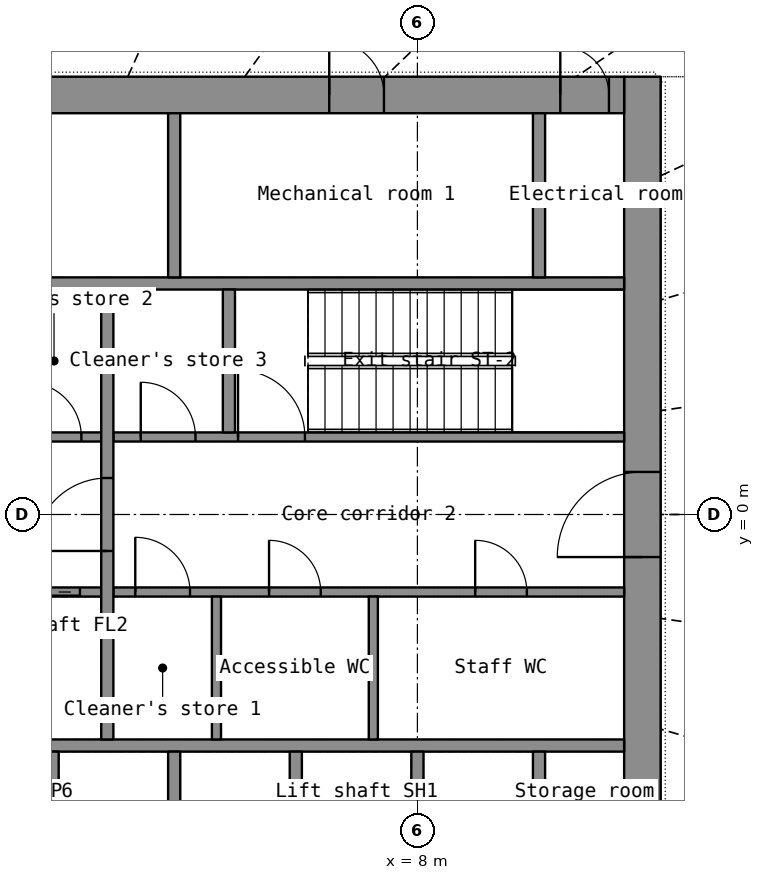
"""IFC4 building model, lengths in metres.
Left out: names, types, materials, properties, quantities, classifications, styles, units other than length and angle.
Written with IfcOpenShell. Run it as: python <this file> out.ifc"""

import sys

from ifc_helpers import new_model, si_unit, direction, frame, frame_2d, origin, place, context, subcontext, project, spatial, rectangle, extrude, element, fill, save


model = new_model("IFC4")
c1 = context("Model", 3, precision=1e-05, world=origin(), true_north=direction((0.0, 1.0)))
c2 = subcontext(c1, "Body", "Model", "MODEL_VIEW")
j1 = project(units=[si_unit("LENGTHUNIT", "METRE"), si_unit("PLANEANGLEUNIT", "RADIAN")], contexts=[c1])
p1 = place(None, origin())
s1 = spatial("IfcSite", under=j1, at=p1, CompositionType="ELEMENT")
p2 = place(p1, origin())
s2 = spatial("IfcBuilding", under=s1, at=p2, CompositionType="ELEMENT")
p3 = place(p2, frame((0.0, 0.0, 20.0)))
s3 = spatial("IfcBuildingStorey", under=s2, at=p3, CompositionType="ELEMENT", Elevation=20.0)
p4 = place(p3, frame((11.7, -7.2, 0.0), z_axis=(0.0, 0.0, 1.0), x_axis=(0.0, 1.0, 0.0)))
e1 = element("IfcWall", 1, at=p4, inside=s3, PredefinedType="SHEAR", context=c2, shape_type="SweptSolid", body=[
    extrude(rectangle(XDim=14.4, YDim=0.6, at=frame_2d((7.2, 0.0))), origin(), (0.0, 0.0, 1.0), 4.1),
])
p5 = place(p4, frame((6.5, 0.0, 0.0)))
e2 = element("IfcOpeningElement", 2, at=p5, cuts=e1, PredefinedType="OPENING", context=c2, shape_type="SweptSolid", body=[
    extrude(rectangle(XDim=1.4, YDim=2.2, at=frame_2d((0.7, 1.1))), frame((0.0, 0.31, 0.0), z_axis=(0.0, -1.0, 0.0), x_axis=(1.0, 0.0, 0.0)), (0.0, 0.0, 1.0), 0.62),
])
p6 = place(p3, frame((-11.4, 6.9, 0.0), z_axis=(0.0, 0.0, 1.0), x_axis=(1.0, 0.0, 0.0)))
e3 = element("IfcWall", 3, at=p6, inside=s3, PredefinedType="SHEAR", context=c2, shape_type="SweptSolid", body=[
    extrude(rectangle(XDim=22.8, YDim=0.6, at=frame_2d((11.4, 0.0))), origin(), (0.0, 0.0, 1.0), 4.1),
])
p7 = place(p6, frame((1.85, 0.0, 0.0)))
e4 = element("IfcOpeningElement", 4, at=p7, cuts=e3, PredefinedType="OPENING", context=c2, shape_type="SweptSolid", body=[
    extrude(rectangle(XDim=1.1, YDim=2.2, at=frame_2d((0.55, 1.1))), frame((0.0, 0.31, 0.0), z_axis=(0.0, -1.0, 0.0), x_axis=(1.0, 0.0, 0.0)), (0.0, 0.0, 1.0), 0.62),
])
p8 = place(p6, frame((9.95, 0.0, 0.0)))
e5 = element("IfcOpeningElement", 5, at=p8, cuts=e3, PredefinedType="OPENING", context=c2, shape_type="SweptSolid", body=[
    extrude(rectangle(XDim=0.9, YDim=2.1, at=frame_2d((0.45, 1.05))), frame((0.0, 0.31, 0.0), z_axis=(0.0, -1.0, 0.0), x_axis=(1.0, 0.0, 0.0)), (0.0, 0.0, 1.0), 0.62),
])
p9 = place(p6, frame((17.95, 0.0, 0.0)))
e6 = element("IfcOpeningElement", 6, at=p9, cuts=e3, PredefinedType="OPENING", context=c2, shape_type="SweptSolid", body=[
    extrude(rectangle(XDim=0.9, YDim=2.1, at=frame_2d((0.45, 1.05))), frame((0.0, 0.31, 0.0), z_axis=(0.0, -1.0, 0.0), x_axis=(1.0, 0.0, 0.0)), (0.0, 0.0, 1.0), 0.62),
])
p10 = place(p6, frame((0.25, 0.0, 0.0)))
e7 = element("IfcOpeningElement", 7, at=p10, cuts=e3, PredefinedType="OPENING", context=c2, shape_type="SweptSolid", body=[
    extrude(rectangle(XDim=0.8, YDim=2.05, at=frame_2d((0.4, 1.025))), frame((0.0, 0.31, 0.0), z_axis=(0.0, -1.0, 0.0), x_axis=(1.0, 0.0, 0.0)), (0.0, 0.0, 1.0), 0.62),
])
p11 = place(p6, frame((21.75, 0.0, 0.0)))
e8 = element("IfcOpeningElement", 8, at=p11, cuts=e3, PredefinedType="OPENING", context=c2, shape_type="SweptSolid", body=[
    extrude(rectangle(XDim=0.8, YDim=2.05, at=frame_2d((0.4, 1.025))), frame((0.0, 0.31, 0.0), z_axis=(0.0, -1.0, 0.0), x_axis=(1.0, 0.0, 0.0)), (0.0, 0.0, 1.0), 0.62),
])
for number, where, z_axis, x_axis in (
    (9, (-11.4, -3.8, 0.0), (0.0, 0.0, 1.0), (1.0, 0.0, 0.0)),
    (10, (-11.4, 3.8, 0.0), (0.0, 0.0, 1.0), (1.0, 0.0, 0.0)),
):
    element("IfcWall", number, at=place(p3, frame(where, z_axis=z_axis, x_axis=x_axis)), inside=s3, PredefinedType="SHEAR", context=c2, shape_type="SweptSolid", body=[
        extrude(rectangle(XDim=22.8, YDim=0.2, at=frame_2d((11.4, 0.0))), origin(), (0.0, 0.0, 1.0), 4.1),
    ])
for number, where, z_axis, x_axis in (
    (11, (2.0, -6.6, 0.0), (0.0, 0.0, 1.0), (0.0, 1.0, 0.0)),
    (12, (4.0, -6.6, 0.0), (0.0, 0.0, 1.0), (0.0, 1.0, 0.0)),
    (13, (6.0, -6.6, 0.0), (0.0, 0.0, 1.0), (0.0, 1.0, 0.0)),
    (14, (8.0, -6.6, 0.0), (0.0, 0.0, 1.0), (0.0, 1.0, 0.0)),
    (15, (10.0, -6.6, 0.0), (0.0, 0.0, 1.0), (0.0, 1.0, 0.0)),
    (16, (10.0, 3.9, 0.0), (0.0, 0.0, 1.0), (0.0, 1.0, 0.0)),
):
    element("IfcWall", number, at=place(p3, frame(where, z_axis=z_axis, x_axis=x_axis)), inside=s3, PredefinedType="SHEAR", context=c2, shape_type="SweptSolid", body=[
        extrude(rectangle(XDim=2.7, YDim=0.2, at=frame_2d((1.35, 0.0))), origin(), (0.0, 0.0, 1.0), 4.1),
    ])
p12 = place(p3, frame((4.0, 3.9, 0.0), z_axis=(0.0, 0.0, 1.0), x_axis=(0.0, 1.0, 0.0)))
e17 = element("IfcWall", 17, at=p12, inside=s3, PredefinedType="PARTITIONING", context=c2, shape_type="SweptSolid", body=[
    extrude(rectangle(XDim=2.7, YDim=0.2, at=frame_2d((1.35, 0.0))), origin(), (0.0, 0.0, 1.0), 4.1),
])
p13 = place(p3, frame((-2.8, -1.275, 0.0), z_axis=(0.0, 0.0, 1.0), x_axis=(1.0, 0.0, 0.0)))
e18 = element("IfcWall", 18, at=p13, inside=s3, PredefinedType="SHEAR", context=c2, shape_type="SweptSolid", body=[
    extrude(rectangle(XDim=5.6, YDim=0.15, at=frame_2d((2.8, 0.0))), origin(), (0.0, 0.0, 1.0), 4.1),
])
p14 = place(p13, frame((4.15, 0.0, 0.0)))
e19 = element("IfcOpeningElement", 19, at=p14, cuts=e18, PredefinedType="OPENING", context=c2, shape_type="SweptSolid", body=[
    extrude(rectangle(XDim=1.1, YDim=2.2, at=frame_2d((0.55, 1.1))), frame((0.0, 0.085, 0.0), z_axis=(0.0, -1.0, 0.0), x_axis=(1.0, 0.0, 0.0)), (0.0, 0.0, 1.0), 0.17),
])
p15 = place(p13, frame((0.326, 0.0, 0.0)))
e20 = element("IfcOpeningElement", 20, at=p15, cuts=e18, PredefinedType="OPENING", context=c2, shape_type="SweptSolid", body=[
    extrude(rectangle(XDim=0.9, YDim=2.1, at=frame_2d((0.45, 1.05))), frame((0.0, 0.085, 0.0), z_axis=(0.0, -1.0, 0.0), x_axis=(1.0, 0.0, 0.0)), (0.0, 0.0, 1.0), 0.17),
])
p16 = place(p13, frame((2.201, 0.0, 0.0)))
e21 = element("IfcOpeningElement", 21, at=p16, cuts=e18, PredefinedType="OPENING", context=c2, shape_type="SweptSolid", body=[
    extrude(rectangle(XDim=0.9, YDim=2.1, at=frame_2d((0.45, 1.05))), frame((0.0, 0.085, 0.0), z_axis=(0.0, -1.0, 0.0), x_axis=(1.0, 0.0, 0.0)), (0.0, 0.0, 1.0), 0.17),
])
p17 = place(p3, frame((3.0, -1.275, 0.0), z_axis=(0.0, 0.0, 1.0), x_axis=(1.0, 0.0, 0.0)))
e22 = element("IfcWall", 22, at=p17, inside=s3, PredefinedType="PARTITIONING", context=c2, shape_type="SweptSolid", body=[
    extrude(rectangle(XDim=8.4, YDim=0.15, at=frame_2d((4.2, 0.0))), origin(), (0.0, 0.0, 1.0), 4.1),
])
p18 = place(p17, frame((0.36, 0.0, 0.0)))
e23 = element("IfcOpeningElement", 23, at=p18, cuts=e22, PredefinedType="OPENING", context=c2, shape_type="SweptSolid", body=[
    extrude(rectangle(XDim=0.9, YDim=2.1, at=frame_2d((0.45, 1.05))), frame((0.0, 0.085, 0.0), z_axis=(0.0, -1.0, 0.0), x_axis=(1.0, 0.0, 0.0)), (0.0, 0.0, 1.0), 0.17),
])
p19 = place(p17, frame((2.56, 0.0, 0.0)))
e24 = element("IfcOpeningElement", 24, at=p19, cuts=e22, PredefinedType="OPENING", context=c2, shape_type="SweptSolid", body=[
    extrude(rectangle(XDim=0.85, YDim=2.1, at=frame_2d((0.425, 1.05))), frame((0.0, 0.085, 0.0), z_axis=(0.0, -1.0, 0.0), x_axis=(1.0, 0.0, 0.0)), (0.0, 0.0, 1.0), 0.17),
])
p20 = place(p17, frame((5.95, 0.0, 0.0)))
e25 = element("IfcOpeningElement", 25, at=p20, cuts=e22, PredefinedType="OPENING", context=c2, shape_type="SweptSolid", body=[
    extrude(rectangle(XDim=0.85, YDim=2.1, at=frame_2d((0.425, 1.05))), frame((0.0, 0.085, 0.0), z_axis=(0.0, -1.0, 0.0), x_axis=(1.0, 0.0, 0.0)), (0.0, 0.0, 1.0), 0.17),
])
p21 = place(p3, frame((-2.8, 1.275, 0.0), z_axis=(0.0, 0.0, 1.0), x_axis=(1.0, 0.0, 0.0)))
e26 = element("IfcWall", 26, at=p21, inside=s3, PredefinedType="SHEAR", context=c2, shape_type="SweptSolid", body=[
    extrude(rectangle(XDim=5.6, YDim=0.15, at=frame_2d((2.8, 0.0))), origin(), (0.0, 0.0, 1.0), 4.1),
])
p22 = place(p21, frame((0.35, 0.0, 0.0)))
e27 = element("IfcOpeningElement", 27, at=p22, cuts=e26, PredefinedType="OPENING", context=c2, shape_type="SweptSolid", body=[
    extrude(rectangle(XDim=1.1, YDim=2.2, at=frame_2d((0.55, 1.1))), frame((0.0, 0.085, 0.0), z_axis=(0.0, -1.0, 0.0), x_axis=(1.0, 0.0, 0.0)), (0.0, 0.0, 1.0), 0.17),
])
p23 = place(p21, frame((2.499, 0.0, 0.0)))
e28 = element("IfcOpeningElement", 28, at=p23, cuts=e26, PredefinedType="OPENING", context=c2, shape_type="SweptSolid", body=[
    extrude(rectangle(XDim=0.9, YDim=2.1, at=frame_2d((0.45, 1.05))), frame((0.0, 0.085, 0.0), z_axis=(0.0, -1.0, 0.0), x_axis=(1.0, 0.0, 0.0)), (0.0, 0.0, 1.0), 0.17),
])
p24 = place(p21, frame((4.374, 0.0, 0.0)))
e29 = element("IfcOpeningElement", 29, at=p24, cuts=e26, PredefinedType="OPENING", context=c2, shape_type="SweptSolid", body=[
    extrude(rectangle(XDim=0.9, YDim=2.1, at=frame_2d((0.45, 1.05))), frame((0.0, 0.085, 0.0), z_axis=(0.0, -1.0, 0.0), x_axis=(1.0, 0.0, 0.0)), (0.0, 0.0, 1.0), 0.17),
])
p25 = place(p3, frame((3.0, 1.275, 0.0), z_axis=(0.0, 0.0, 1.0), x_axis=(1.0, 0.0, 0.0)))
e30 = element("IfcWall", 30, at=p25, inside=s3, PredefinedType="SHEAR", context=c2, shape_type="SweptSolid", body=[
    extrude(rectangle(XDim=8.4, YDim=0.15, at=frame_2d((4.2, 0.0))), origin(), (0.0, 0.0, 1.0), 4.1),
])
p26 = place(p25, frame((2.05, 0.0, 0.0)))
e31 = element("IfcOpeningElement", 31, at=p26, cuts=e30, PredefinedType="OPENING", context=c2, shape_type="SweptSolid", body=[
    extrude(rectangle(XDim=1.1, YDim=2.15, at=frame_2d((0.55, 1.075))), frame((0.0, 0.085, 0.0), z_axis=(0.0, -1.0, 0.0), x_axis=(1.0, 0.0, 0.0)), (0.0, 0.0, 1.0), 0.17),
])
p27 = place(p25, frame((0.45, 0.0, 0.0)))
e32 = element("IfcOpeningElement", 32, at=p27, cuts=e30, PredefinedType="OPENING", context=c2, shape_type="SweptSolid", body=[
    extrude(rectangle(XDim=0.9, YDim=2.1, at=frame_2d((0.45, 1.05))), frame((0.0, 0.085, 0.0), z_axis=(0.0, -1.0, 0.0), x_axis=(1.0, 0.0, 0.0)), (0.0, 0.0, 1.0), 0.17),
])
p28 = place(p3, frame((2.9, -3.7, 0.0), z_axis=(0.0, 0.0, 1.0), x_axis=(0.0, 1.0, 0.0)))
e33 = element("IfcWall", 33, at=p28, inside=s3, PredefinedType="SHEAR", context=c2, shape_type="SweptSolid", body=[
    extrude(rectangle(XDim=7.4, YDim=0.2, at=frame_2d((3.7, 0.0))), origin(), (0.0, 0.0, 1.0), 4.1),
])
p29 = place(p28, frame((3.1, 0.0, 0.0)))
e34 = element("IfcOpeningElement", 34, at=p29, cuts=e33, PredefinedType="OPENING", context=c2, shape_type="SweptSolid", body=[
    extrude(rectangle(XDim=1.2, YDim=2.2, at=frame_2d((0.6, 1.1))), frame((0.0, 0.11, 0.0), z_axis=(0.0, -1.0, 0.0), x_axis=(1.0, 0.0, 0.0)), (0.0, 0.0, 1.0), 0.22),
])
p30 = place(p3, frame((4.9, 1.35, 0.0), z_axis=(0.0, 0.0, 1.0), x_axis=(0.0, 1.0, 0.0)))
e35 = element("IfcWall", 35, at=p30, inside=s3, PredefinedType="SHEAR", context=c2, shape_type="SweptSolid", body=[
    extrude(rectangle(XDim=2.35, YDim=0.2, at=frame_2d((1.175, 0.0))), origin(), (0.0, 0.0, 1.0), 4.1),
])
for number, where, z_axis, x_axis in (
    (36, (4.695, -3.7, 0.0), (0.0, 0.0, 1.0), (0.0, 1.0, 0.0)),
    (37, (7.275, -3.7, 0.0), (0.0, 0.0, 1.0), (0.0, 1.0, 0.0)),
):
    element("IfcWall", number, at=place(p3, frame(where, z_axis=z_axis, x_axis=x_axis)), inside=s3, PredefinedType="PARTITIONING", context=c2, shape_type="SweptSolid", body=[
        extrude(rectangle(XDim=2.35, YDim=0.15, at=frame_2d((1.175, 0.0))), origin(), (0.0, 0.0, 1.0), 4.1),
    ])
p31 = place(p9, origin())
e38 = element("IfcDoor", 38, at=p31, inside=s3, OperationType="SINGLE_SWING_LEFT", PredefinedType="DOOR", context=c2, shape_type="SweptSolid", body=[
    extrude(rectangle(XDim=0.9, YDim=2.1, at=frame_2d((0.45, 1.05))), frame((0.0, 0.025, 0.0), z_axis=(0.0, -1.0, 0.0), x_axis=(1.0, 0.0, 0.0)), (0.0, 0.0, 1.0), 0.05),
])
fill(e6, e38)
p32 = place(p11, origin())
e39 = element("IfcDoor", 39, at=p32, inside=s3, OperationType="SINGLE_SWING_LEFT", PredefinedType="DOOR", context=c2, shape_type="SweptSolid", body=[
    extrude(rectangle(XDim=0.8, YDim=2.05, at=frame_2d((0.4, 1.025))), frame((0.0, 0.025, 0.0), z_axis=(0.0, -1.0, 0.0), x_axis=(1.0, 0.0, 0.0)), (0.0, 0.0, 1.0), 0.05),
])
fill(e8, e39)
p33 = place(p5, origin())
e40 = element("IfcDoor", 40, at=p33, inside=s3, OperationType="DOUBLE_DOOR_SINGLE_SWING", PredefinedType="DOOR", context=c2, shape_type="SweptSolid", body=[
    extrude(rectangle(XDim=1.4, YDim=2.2, at=frame_2d((0.7, 1.1))), frame((0.0, 0.025, 0.0), z_axis=(0.0, -1.0, 0.0), x_axis=(1.0, 0.0, 0.0)), (0.0, 0.0, 1.0), 0.05),
])
fill(e2, e40)
p34 = place(p29, origin())
e41 = element("IfcDoor", 41, at=p34, inside=s3, OperationType="SINGLE_SWING_LEFT", PredefinedType="DOOR", context=c2, shape_type="SweptSolid", body=[
    extrude(rectangle(XDim=1.2, YDim=2.2, at=frame_2d((0.6, 1.1))), frame((0.0, 0.025, 0.0), z_axis=(0.0, -1.0, 0.0), x_axis=(1.0, 0.0, 0.0)), (0.0, 0.0, 1.0), 0.05),
])
fill(e34, e41)
p35 = place(p14, origin())
e42 = element("IfcDoor", 42, at=p35, inside=s3, OperationType="DOUBLE_DOOR_SLIDING", PredefinedType="DOOR", context=c2, shape_type="SweptSolid", body=[
    extrude(rectangle(XDim=1.1, YDim=2.2, at=frame_2d((0.55, 1.1))), frame((0.0, 0.025, 0.0), z_axis=(0.0, -1.0, 0.0), x_axis=(1.0, 0.0, 0.0)), (0.0, 0.0, 1.0), 0.05),
])
fill(e19, e42)
p36 = place(p26, origin())
e43 = element("IfcDoor", 43, at=p36, inside=s3, OperationType="SINGLE_SWING_LEFT", PredefinedType="DOOR", context=c2, shape_type="SweptSolid", body=[
    extrude(rectangle(XDim=1.1, YDim=2.15, at=frame_2d((0.55, 1.075))), frame((0.0, 0.025, 0.0), z_axis=(0.0, -1.0, 0.0), x_axis=(1.0, 0.0, 0.0)), (0.0, 0.0, 1.0), 0.05),
])
fill(e31, e43)
p37 = place(p18, origin())
e44 = element("IfcDoor", 44, at=p37, inside=s3, OperationType="SINGLE_SWING_LEFT", PredefinedType="DOOR", context=c2, shape_type="SweptSolid", body=[
    extrude(rectangle(XDim=0.9, YDim=2.1, at=frame_2d((0.45, 1.05))), frame((0.0, 0.025, 0.0), z_axis=(0.0, -1.0, 0.0), x_axis=(1.0, 0.0, 0.0)), (0.0, 0.0, 1.0), 0.05),
])
fill(e23, e44)
p38 = place(p19, origin())
e45 = element("IfcDoor", 45, at=p38, inside=s3, OperationType="SINGLE_SWING_LEFT", PredefinedType="DOOR", context=c2, shape_type="SweptSolid", body=[
    extrude(rectangle(XDim=0.85, YDim=2.1, at=frame_2d((0.425, 1.05))), frame((0.0, 0.025, 0.0), z_axis=(0.0, -1.0, 0.0), x_axis=(1.0, 0.0, 0.0)), (0.0, 0.0, 1.0), 0.05),
])
fill(e24, e45)
p39 = place(p20, origin())
e46 = element("IfcDoor", 46, at=p39, inside=s3, OperationType="SINGLE_SWING_LEFT", PredefinedType="DOOR", context=c2, shape_type="SweptSolid", body=[
    extrude(rectangle(XDim=0.85, YDim=2.1, at=frame_2d((0.425, 1.05))), frame((0.0, 0.025, 0.0), z_axis=(0.0, -1.0, 0.0), x_axis=(1.0, 0.0, 0.0)), (0.0, 0.0, 1.0), 0.05),
])
fill(e25, e46)
p40 = place(p24, origin())
e47 = element("IfcDoor", 47, at=p40, inside=s3, OperationType="SINGLE_SWING_LEFT", PredefinedType="DOOR", context=c2, shape_type="SweptSolid", body=[
    extrude(rectangle(XDim=0.9, YDim=2.1, at=frame_2d((0.45, 1.05))), frame((0.0, 0.025, 0.0), z_axis=(0.0, -1.0, 0.0), x_axis=(1.0, 0.0, 0.0)), (0.0, 0.0, 1.0), 0.05),
])
fill(e29, e47)
p41 = place(p27, origin())
e48 = element("IfcDoor", 48, at=p41, inside=s3, OperationType="SINGLE_SWING_LEFT", PredefinedType="DOOR", context=c2, shape_type="SweptSolid", body=[
    extrude(rectangle(XDim=0.9, YDim=2.1, at=frame_2d((0.45, 1.05))), frame((0.0, 0.025, 0.0), z_axis=(0.0, -1.0, 0.0), x_axis=(1.0, 0.0, 0.0)), (0.0, 0.0, 1.0), 0.05),
])
fill(e32, e48)
save(model, sys.argv[1])
